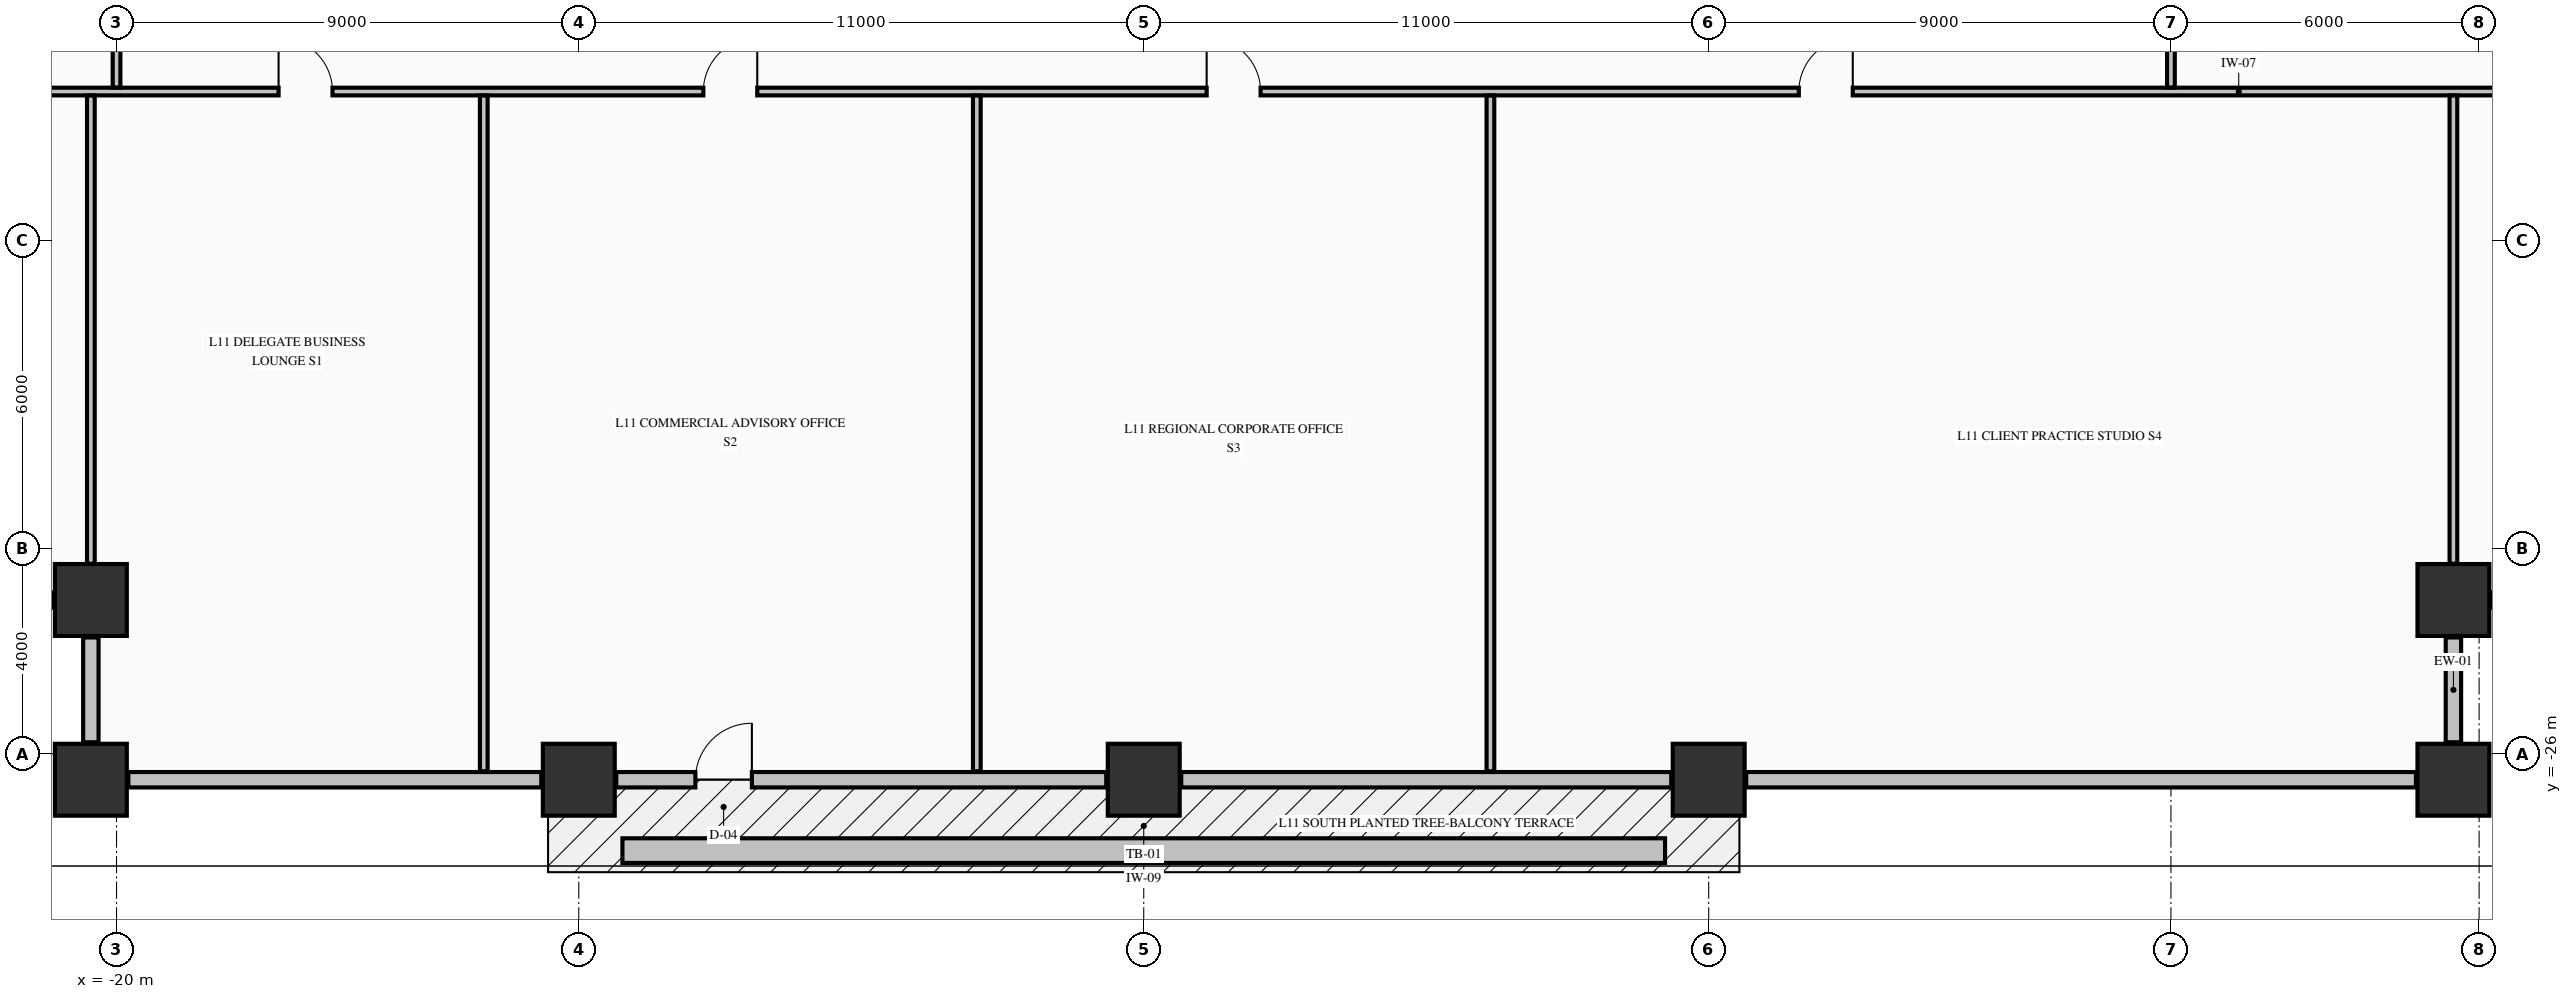
"""IFC4 building model, lengths in metres.
Left out: names, types, materials, properties, quantities, classifications, styles, units other than length and angle.
Written with IfcOpenShell. Run it as: python <this file> out.ifc"""

import sys

from ifc_helpers import new_model, si_unit, direction, frame, frame_2d, origin, origin_2d, place, context, subcontext, project, spatial, rectangle, extrude, element, fill, save


model = new_model("IFC4")
c1 = context("Model", 3, precision=1e-05, world=origin(), true_north=direction((0.0, 1.0)))
c2 = subcontext(c1, "Body", "Model", "MODEL_VIEW")
j1 = project(units=[si_unit("LENGTHUNIT", "METRE"), si_unit("PLANEANGLEUNIT", "RADIAN")], contexts=[c1])
p1 = place(None, origin())
s1 = spatial("IfcSite", under=j1, at=p1, CompositionType="ELEMENT")
p2 = place(p1, origin())
s2 = spatial("IfcBuilding", under=s1, at=p2, CompositionType="ELEMENT")
p3 = place(p2, frame((0.0, 0.0, 48.62)))
s3 = spatial("IfcBuildingStorey", under=s2, at=p3, CompositionType="ELEMENT", Elevation=48.62)
for number, where, z_axis, x_axis in (
    (1, (-20.5, -26.5, -0.25), (0.0, 0.0, 1.0), (1.0, 0.0, 0.0)),
    (2, (-11.0, -26.5, -0.25), (0.0, 0.0, 1.0), (1.0, 0.0, 0.0)),
    (3, (0.0, -26.5, -0.25), (0.0, 0.0, 1.0), (1.0, 0.0, 0.0)),
    (4, (11.0, -26.5, -0.25), (0.0, 0.0, 1.0), (1.0, 0.0, 0.0)),
    (5, (25.5, -26.5, -0.25), (0.0, 0.0, 1.0), (1.0, 0.0, 0.0)),
    (6, (-20.5, -23.0, -0.25), (0.0, 0.0, 1.0), (1.0, 0.0, 0.0)),
    (7, (25.5, -23.0, -0.25), (0.0, 0.0, 1.0), (1.0, 0.0, 0.0)),
):
    element("IfcColumn", number, at=place(p3, frame(where, z_axis=z_axis, x_axis=x_axis)), inside=s3, PredefinedType="COLUMN", context=c2, shape_type="SweptSolid", body=[
        extrude(rectangle(XDim=1.4, YDim=1.4, at=origin_2d()), origin(), (0.0, 0.0, 1.0), 3.395),
    ])
for number, where, z_axis, x_axis in (
    (8, (25.5, -25.77, 0.0), (0.0, 0.0, 1.0), (0.0, 1.0, 0.0)),
    (9, (26.23, -23.0, 0.0), (0.0, 0.0, 1.0), (1.0, 0.0, 0.0)),
    (10, (-23.27, -23.0, 0.0), (0.0, 0.0, 1.0), (1.0, 0.0, 0.0)),
    (11, (-20.5, -23.73, 0.0), (0.0, 0.0, 1.0), (0.0, -1.0, 0.0)),
):
    element("IfcWall", number, at=place(p3, frame(where, z_axis=z_axis, x_axis=x_axis)), inside=s3, PredefinedType="STANDARD", context=c2, shape_type="SweptSolid", body=[
        extrude(rectangle(XDim=2.04, YDim=0.3, at=frame_2d((1.02, 0.0))), origin(), (0.0, 0.0, 1.0), 2.537),
    ])
p4 = place(p3, frame((-19.77, -26.5, 0.0), z_axis=(0.0, 0.0, 1.0), x_axis=(1.0, 0.0, 0.0)))
e12 = element("IfcWall", 12, at=p4, inside=s3, PredefinedType="STANDARD", context=c2, shape_type="SweptSolid", body=[
    extrude(rectangle(XDim=8.04, YDim=0.3, at=frame_2d((4.02, 0.0))), origin(), (0.0, 0.0, 1.0), 2.537),
])
p5 = place(p3, frame((-10.27, -26.5, 0.0), z_axis=(0.0, 0.0, 1.0), x_axis=(1.0, 0.0, 0.0)))
e13 = element("IfcWall", 13, at=p5, inside=s3, PredefinedType="STANDARD", context=c2, shape_type="SweptSolid", body=[
    extrude(rectangle(XDim=9.54, YDim=0.3, at=frame_2d((4.77, 0.0))), origin(), (0.0, 0.0, 1.0), 2.537),
])
p6 = place(p5, frame((1.54, 0.0, 0.0)))
e14 = element("IfcOpeningElement", 14, at=p6, cuts=e13, PredefinedType="OPENING", context=c2, shape_type="SweptSolid", body=[
    extrude(rectangle(XDim=1.1, YDim=2.15, at=frame_2d((0.55, 1.075))), frame((0.0, 0.16, 0.0), z_axis=(0.0, -1.0, 0.0), x_axis=(1.0, 0.0, 0.0)), (0.0, 0.0, 1.0), 0.32),
])
p7 = place(p3, frame((0.73, -26.5, 0.0), z_axis=(0.0, 0.0, 1.0), x_axis=(1.0, 0.0, 0.0)))
e15 = element("IfcWall", 15, at=p7, inside=s3, PredefinedType="STANDARD", context=c2, shape_type="SweptSolid", body=[
    extrude(rectangle(XDim=9.54, YDim=0.3, at=frame_2d((4.77, 0.0))), origin(), (0.0, 0.0, 1.0), 2.537),
])
p8 = place(p3, frame((11.73, -26.5, 0.0), z_axis=(0.0, 0.0, 1.0), x_axis=(1.0, 0.0, 0.0)))
e16 = element("IfcWall", 16, at=p8, inside=s3, PredefinedType="STANDARD", context=c2, shape_type="SweptSolid", body=[
    extrude(rectangle(XDim=13.04, YDim=0.3, at=frame_2d((6.52, 0.0))), origin(), (0.0, 0.0, 1.0), 2.537),
])
p9 = place(p3, frame((-23.835, -13.1, 0.0), z_axis=(0.0, 0.0, 1.0), x_axis=(1.0, 0.0, 0.0)))
e17 = element("IfcWall", 17, at=p9, inside=s3, PredefinedType="PARTITIONING", context=c2, shape_type="SweptSolid", body=[
    extrude(rectangle(XDim=52.67, YDim=0.15, at=frame_2d((26.335, 0.0))), origin(), (0.0, 0.0, 1.0), 3.145),
])
p10 = place(p9, frame((6.99, 0.0, 0.0)))
e18 = element("IfcOpeningElement", 18, at=p10, cuts=e17, PredefinedType="OPENING", context=c2, shape_type="SweptSolid", body=[
    extrude(rectangle(XDim=1.05, YDim=2.15, at=frame_2d((0.525, 1.075))), frame((0.0, 0.085, 0.0), z_axis=(0.0, -1.0, 0.0), x_axis=(1.0, 0.0, 0.0)), (0.0, 0.0, 1.0), 0.17),
])
p11 = place(p9, frame((15.26, 0.0, 0.0)))
e19 = element("IfcOpeningElement", 19, at=p11, cuts=e17, PredefinedType="OPENING", context=c2, shape_type="SweptSolid", body=[
    extrude(rectangle(XDim=1.05, YDim=2.15, at=frame_2d((0.525, 1.075))), frame((0.0, 0.085, 0.0), z_axis=(0.0, -1.0, 0.0), x_axis=(1.0, 0.0, 0.0)), (0.0, 0.0, 1.0), 0.17),
])
p12 = place(p9, frame((25.06, 0.0, 0.0)))
e20 = element("IfcOpeningElement", 20, at=p12, cuts=e17, PredefinedType="OPENING", context=c2, shape_type="SweptSolid", body=[
    extrude(rectangle(XDim=1.05, YDim=2.15, at=frame_2d((0.525, 1.075))), frame((0.0, 0.085, 0.0), z_axis=(0.0, -1.0, 0.0), x_axis=(1.0, 0.0, 0.0)), (0.0, 0.0, 1.0), 0.17),
])
p13 = place(p9, frame((36.59, 0.0, 0.0)))
e21 = element("IfcOpeningElement", 21, at=p13, cuts=e17, PredefinedType="OPENING", context=c2, shape_type="SweptSolid", body=[
    extrude(rectangle(XDim=1.05, YDim=2.15, at=frame_2d((0.525, 1.075))), frame((0.0, 0.085, 0.0), z_axis=(0.0, -1.0, 0.0), x_axis=(1.0, 0.0, 0.0)), (0.0, 0.0, 1.0), 0.17),
])
p14 = place(p3, frame((-20.5, -22.294, 0.0), z_axis=(0.0, 0.0, 1.0), x_axis=(0.0, 1.0, 0.0)))
e22 = element("IfcWall", 22, at=p14, inside=s3, PredefinedType="PARTITIONING", context=c2, shape_type="SweptSolid", body=[
    extrude(rectangle(XDim=9.116, YDim=0.15, at=frame_2d((4.558, 0.0))), origin(), (0.0, 0.0, 1.0), 3.145),
])
p15 = place(p3, frame((-20.0, -13.022, 0.0), z_axis=(0.0, 0.0, 1.0), x_axis=(0.0, 1.0, 0.0)))
e23 = element("IfcWall", 23, at=p15, inside=s3, PredefinedType="PARTITIONING", context=c2, shape_type="SweptSolid", body=[
    extrude(rectangle(XDim=2.466, YDim=0.15, at=frame_2d((1.233, 0.0))), origin(), (0.0, 0.0, 1.0), 3.145),
])
p16 = place(p15, frame((1.027, 0.0, 0.0)))
e24 = element("IfcOpeningElement", 24, at=p16, cuts=e23, PredefinedType="OPENING", context=c2, shape_type="SweptSolid", body=[
    extrude(rectangle(XDim=0.95, YDim=2.15, at=frame_2d((0.475, 1.075))), frame((0.0, 0.085, 0.0), z_axis=(0.0, -1.0, 0.0), x_axis=(1.0, 0.0, 0.0)), (0.0, 0.0, 1.0), 0.17),
])
for number, where, z_axis, x_axis in (
    (25, (-12.85, -26.335, 0.0), (0.0, 0.0, 1.0), (0.0, 1.0, 0.0)),
    (26, (-3.25, -26.335, 0.0), (0.0, 0.0, 1.0), (0.0, 1.0, 0.0)),
    (27, (6.75, -26.335, 0.0), (0.0, 0.0, 1.0), (0.0, 1.0, 0.0)),
):
    element("IfcWall", number, at=place(p3, frame(where, z_axis=z_axis, x_axis=x_axis)), inside=s3, PredefinedType="PARTITIONING", context=c2, shape_type="SweptSolid", body=[
        extrude(rectangle(XDim=13.157, YDim=0.15, at=frame_2d((6.579, 0.0))), origin(), (0.0, 0.0, 1.0), 3.145),
    ])
p17 = place(p3, frame((20.0, -13.022, 0.0), z_axis=(0.0, 0.0, 1.0), x_axis=(0.0, 1.0, 0.0)))
e28 = element("IfcWall", 28, at=p17, inside=s3, PredefinedType="PARTITIONING", context=c2, shape_type="SweptSolid", body=[
    extrude(rectangle(XDim=2.466, YDim=0.15, at=frame_2d((1.233, 0.0))), origin(), (0.0, 0.0, 1.0), 2.485),
])
p18 = place(p17, frame((1.027, 0.0, 0.0)))
e29 = element("IfcOpeningElement", 29, at=p18, cuts=e28, PredefinedType="OPENING", context=c2, shape_type="SweptSolid", body=[
    extrude(rectangle(XDim=0.95, YDim=2.15, at=frame_2d((0.475, 1.075))), frame((0.0, 0.085, 0.0), z_axis=(0.0, -1.0, 0.0), x_axis=(1.0, 0.0, 0.0)), (0.0, 0.0, 1.0), 0.17),
])
p19 = place(p3, frame((25.5, -22.294, 0.0), z_axis=(0.0, 0.0, 1.0), x_axis=(0.0, 1.0, 0.0)))
e30 = element("IfcWall", 30, at=p19, inside=s3, PredefinedType="PARTITIONING", context=c2, shape_type="SweptSolid", body=[
    extrude(rectangle(XDim=9.116, YDim=0.15, at=frame_2d((4.558, 0.0))), origin(), (0.0, 0.0, 1.0), 3.145),
])
p20 = place(p3, frame((-10.15, -27.88, -0.04), z_axis=(0.0, 0.0, 1.0), x_axis=(1.0, 0.0, 0.0)))
e31 = element("IfcWall", 31, at=p20, inside=s3, PredefinedType="PARAPET", context=c2, shape_type="SweptSolid", body=[
    extrude(rectangle(XDim=20.3, YDim=0.48, at=frame_2d((10.15, 0.0))), origin(), (0.0, 0.0, 1.0), 0.52),
])
p21 = place(p6, origin())
e32 = element("IfcDoor", 32, at=p21, inside=s3, OperationType="SINGLE_SWING_RIGHT", PredefinedType="DOOR", context=c2, shape_type="SweptSolid", body=[
    extrude(rectangle(XDim=1.1, YDim=2.15, at=frame_2d((0.55, 1.075))), frame((0.0, 0.025, 0.0), z_axis=(0.0, -1.0, 0.0), x_axis=(1.0, 0.0, 0.0)), (0.0, 0.0, 1.0), 0.05),
])
fill(e14, e32)
p22 = place(p10, origin())
e33 = element("IfcDoor", 33, at=p22, inside=s3, OperationType="SINGLE_SWING_LEFT", PredefinedType="DOOR", context=c2, shape_type="SweptSolid", body=[
    extrude(rectangle(XDim=1.05, YDim=2.15, at=frame_2d((0.525, 1.075))), frame((0.0, 0.025, 0.0), z_axis=(0.0, -1.0, 0.0), x_axis=(1.0, 0.0, 0.0)), (0.0, 0.0, 1.0), 0.05),
])
fill(e18, e33)
p23 = place(p11, origin())
e34 = element("IfcDoor", 34, at=p23, inside=s3, OperationType="SINGLE_SWING_RIGHT", PredefinedType="DOOR", context=c2, shape_type="SweptSolid", body=[
    extrude(rectangle(XDim=1.05, YDim=2.15, at=frame_2d((0.525, 1.075))), frame((0.0, 0.025, 0.0), z_axis=(0.0, -1.0, 0.0), x_axis=(1.0, 0.0, 0.0)), (0.0, 0.0, 1.0), 0.05),
])
fill(e19, e34)
p24 = place(p12, origin())
e35 = element("IfcDoor", 35, at=p24, inside=s3, OperationType="SINGLE_SWING_LEFT", PredefinedType="DOOR", context=c2, shape_type="SweptSolid", body=[
    extrude(rectangle(XDim=1.05, YDim=2.15, at=frame_2d((0.525, 1.075))), frame((0.0, 0.025, 0.0), z_axis=(0.0, -1.0, 0.0), x_axis=(1.0, 0.0, 0.0)), (0.0, 0.0, 1.0), 0.05),
])
fill(e20, e35)
p25 = place(p13, origin())
e36 = element("IfcDoor", 36, at=p25, inside=s3, OperationType="SINGLE_SWING_RIGHT", PredefinedType="DOOR", context=c2, shape_type="SweptSolid", body=[
    extrude(rectangle(XDim=1.05, YDim=2.15, at=frame_2d((0.525, 1.075))), frame((0.0, 0.025, 0.0), z_axis=(0.0, -1.0, 0.0), x_axis=(1.0, 0.0, 0.0)), (0.0, 0.0, 1.0), 0.05),
])
fill(e21, e36)
save(model, sys.argv[1])
